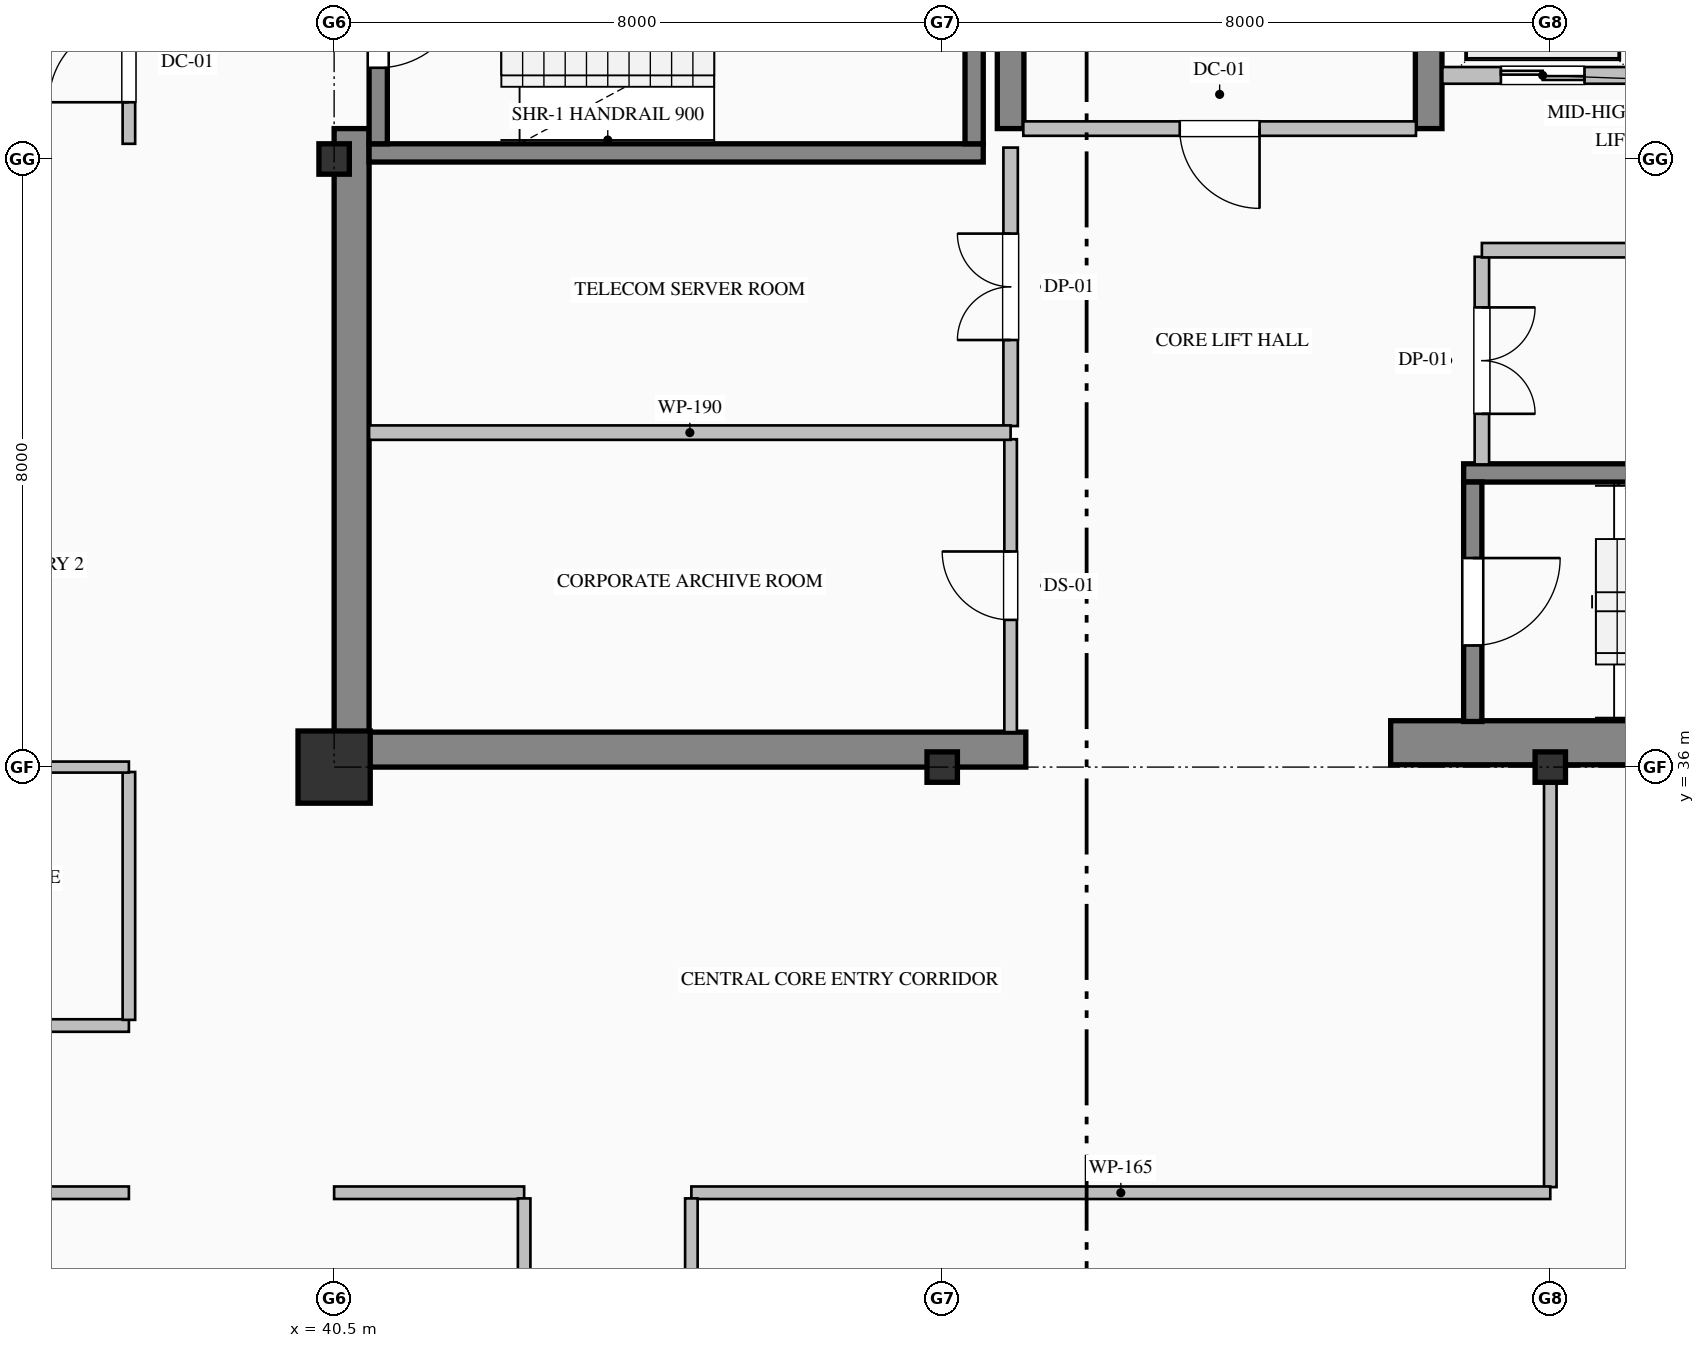
"""IFC4 building model, lengths in metres.
Left out: names, types, materials, properties, quantities, classifications, styles, units other than length and angle.
Written with IfcOpenShell. Run it as: python <this file> out.ifc"""

import sys

from ifc_helpers import new_model, si_unit, direction, frame, frame_2d, origin, origin_2d, place, context, subcontext, project, spatial, rectangle, hollow_rectangle, i_section, extrude, element, fill, save


model = new_model("IFC4")
c1 = context("Model", 3, precision=1e-05, world=origin(), true_north=direction((0.0, 1.0)))
c2 = subcontext(c1, "Body", "Model", "MODEL_VIEW")
j1 = project(units=[si_unit("LENGTHUNIT", "METRE"), si_unit("PLANEANGLEUNIT", "RADIAN")], contexts=[c1])
p1 = place(None, origin())
s1 = spatial("IfcSite", under=j1, at=p1, CompositionType="ELEMENT")
p2 = place(p1, origin())
s2 = spatial("IfcBuilding", under=s1, at=p2, CompositionType="ELEMENT")
p3 = place(p2, frame((0.0, 0.0, 225.8)))
s3 = spatial("IfcBuildingStorey", under=s2, at=p3, CompositionType="ELEMENT", Elevation=225.8)
p4 = place(p3, frame((40.73, 36.46, 0.0), z_axis=(0.0, 0.0, 1.0), x_axis=(0.0, 1.0, 0.0)))
e1 = element("IfcWall", 1, at=p4, inside=s3, PredefinedType="SHEAR", context=c2, shape_type="SweptSolid", body=[
    extrude(rectangle(XDim=7.94, YDim=0.46, at=frame_2d((3.97, 0.0))), origin(), (0.0, 0.0, 1.0), 3.775),
])
p5 = place(p3, frame((40.5, 36.23, 0.0), z_axis=(0.0, 0.0, 1.0), x_axis=(1.0, 0.0, 0.0)))
e2 = element("IfcWall", 2, at=p5, inside=s3, PredefinedType="SHEAR", context=c2, shape_type="SweptSolid", body=[
    extrude(rectangle(XDim=9.1, YDim=0.46, at=frame_2d((4.55, 0.0))), origin(), (0.0, 0.0, 1.0), 3.775),
])
p6 = place(p3, frame((54.4, 36.32, 0.0), z_axis=(0.0, 0.0, 1.0), x_axis=(1.0, 0.0, 0.0)))
e3 = element("IfcWall", 3, at=p6, inside=s3, PredefinedType="SHEAR", context=c2, shape_type="SweptSolid", body=[
    extrude(rectangle(XDim=9.6, YDim=0.58, at=frame_2d((4.8, 0.0))), origin(), (0.0, 0.0, 1.0), 4.0),
])
p7 = place(p3, frame((49.4, 44.4, 0.0), z_axis=(0.0, 0.0, 1.0), x_axis=(0.0, 1.0, 0.0)))
e4 = element("IfcWall", 4, at=p7, inside=s3, PredefinedType="SHEAR", context=c2, shape_type="SweptSolid", body=[
    extrude(rectangle(XDim=3.0, YDim=0.35, at=frame_2d((1.5, 0.0))), origin(), (0.0, 0.0, 1.0), 3.775),
])
p8 = place(p3, frame((54.9, 44.4, 0.0), z_axis=(0.0, 0.0, 1.0), x_axis=(0.0, 1.0, 0.0)))
e5 = element("IfcWall", 5, at=p8, inside=s3, PredefinedType="SHEAR", context=c2, shape_type="SweptSolid", body=[
    extrude(rectangle(XDim=7.14, YDim=0.35, at=frame_2d((3.57, 0.0))), origin(), (0.0, 0.0, 1.0), 3.775),
])
p9 = place(p3, frame((40.5, 36.0, 0.0), z_axis=(0.0, 0.0, 1.0), x_axis=(1.0, 0.0, 0.0)))
e6 = element("IfcColumn", 6, at=p9, inside=s3, PredefinedType="COLUMN", context=c2, shape_type="SweptSolid", body=[
    extrude(hollow_rectangle(XDim=0.95, YDim=0.95, WallThickness=0.036, at=origin_2d()), origin(), (0.0, 0.0, 1.0), 4.0),
])
for number, where, z_axis, x_axis in (
    (7, (40.5, 44.0, 0.0), (0.0, 0.0, 1.0), (1.0, 0.0, 0.0)),
    (8, (48.5, 36.0, 0.0), (0.0, 0.0, 1.0), (1.0, 0.0, 0.0)),
    (9, (56.5, 36.0, 0.0), (0.0, 0.0, 1.0), (1.0, 0.0, 0.0)),
):
    element("IfcColumn", number, at=place(p3, frame(where, z_axis=z_axis, x_axis=x_axis)), inside=s3, PredefinedType="COLUMN", context=c2, shape_type="SweptSolid", body=[
        extrude(i_section(OverallWidth=0.4, OverallDepth=0.4, WebThickness=0.013, FlangeThickness=0.021, FilletRadius=0.022, at=origin_2d()), origin(), (0.0, 0.0, 1.0), 4.0),
    ])
p10 = place(p3, frame((49.04, 44.08, 0.0), z_axis=(0.0, 0.0, 1.0), x_axis=(-1.0, 0.0, 0.0)))
e10 = element("IfcWall", 10, at=p10, inside=s3, PredefinedType="SOLIDWALL", context=c2, shape_type="SweptSolid", body=[
    extrude(rectangle(XDim=8.08, YDim=0.24, at=frame_2d((4.04, 0.0))), origin(), (0.0, 0.0, 1.0), 4.0),
])
p11 = place(p3, frame((41.08, 47.35, 0.0), z_axis=(0.0, 0.0, 1.0), x_axis=(0.0, -1.0, 0.0)))
e11 = element("IfcWall", 11, at=p11, inside=s3, PredefinedType="SOLIDWALL", context=c2, shape_type="SweptSolid", body=[
    extrude(rectangle(XDim=3.15, YDim=0.24, at=frame_2d((1.575, 0.0))), origin(), (0.0, 0.0, 1.0), 4.0),
])
p12 = place(p11, frame((1.0, 0.0, 0.0)))
e12 = element("IfcOpeningElement", 12, at=p12, cuts=e11, PredefinedType="OPENING", context=c2, shape_type="SweptSolid", body=[
    extrude(rectangle(XDim=1.15, YDim=2.2, at=frame_2d((0.575, 1.1))), frame((0.0, 0.13, 0.0), z_axis=(0.0, -1.0, 0.0), x_axis=(1.0, 0.0, 0.0)), (0.0, 0.0, 1.0), 0.26),
])
p13 = place(p3, frame((48.92, 44.2, 0.0), z_axis=(0.0, 0.0, 1.0), x_axis=(0.0, 1.0, 0.0)))
e13 = element("IfcWall", 13, at=p13, inside=s3, PredefinedType="SOLIDWALL", context=c2, shape_type="SweptSolid", body=[
    extrude(rectangle(XDim=3.15, YDim=0.24, at=frame_2d((1.575, 0.0))), origin(), (0.0, 0.0, 1.0), 4.0),
])
p14 = place(p3, frame((55.36, 39.87, 0.0), z_axis=(0.0, 0.0, 1.0), x_axis=(1.0, 0.0, 0.0)))
e14 = element("IfcWall", 14, at=p14, inside=s3, PredefinedType="SOLIDWALL", context=c2, shape_type="SweptSolid", body=[
    extrude(rectangle(XDim=8.08, YDim=0.24, at=frame_2d((4.04, 0.0))), origin(), (0.0, 0.0, 1.0), 4.0),
])
p15 = place(p3, frame((55.48, 39.75, 0.0), z_axis=(0.0, 0.0, 1.0), x_axis=(0.0, -1.0, 0.0)))
e15 = element("IfcWall", 15, at=p15, inside=s3, PredefinedType="SOLIDWALL", context=c2, shape_type="SweptSolid", body=[
    extrude(rectangle(XDim=3.15, YDim=0.24, at=frame_2d((1.575, 0.0))), origin(), (0.0, 0.0, 1.0), 4.0),
])
p16 = place(p15, frame((1.0, 0.0, 0.0)))
e16 = element("IfcOpeningElement", 16, at=p16, cuts=e15, PredefinedType="OPENING", context=c2, shape_type="SweptSolid", body=[
    extrude(rectangle(XDim=1.15, YDim=2.2, at=frame_2d((0.575, 1.1))), frame((0.0, 0.13, 0.0), z_axis=(0.0, -1.0, 0.0), x_axis=(1.0, 0.0, 0.0)), (0.0, 0.0, 1.0), 0.26),
])
p17 = place(p3, frame((63.32, 45.1, 0.0), z_axis=(0.0, 0.0, 1.0), x_axis=(-1.0, 0.0, 0.0)))
e17 = element("IfcWall", 17, at=p17, inside=s3, PredefinedType="PARTITIONING", context=c2, shape_type="SweptSolid", body=[
    extrude(rectangle(XDim=8.24, YDim=0.22, at=frame_2d((4.12, 0.0))), origin(), (0.0, 0.0, 1.0), 3.775),
])
p18 = place(p17, frame((6.37, 0.0, 0.0)))
e18 = element("IfcOpeningElement", 18, at=p18, cuts=e17, PredefinedType="OPENING", context=c2, shape_type="SweptSolid", body=[
    extrude(rectangle(XDim=1.1, YDim=2.2, at=frame_2d((0.55, 1.1))), frame((0.0, 0.12, 0.0), z_axis=(0.0, -1.0, 0.0), x_axis=(1.0, 0.0, 0.0)), (0.0, 0.0, 1.0), 0.24),
])
p19 = place(p17, frame((3.57, 0.0, 0.0)))
e19 = element("IfcOpeningElement", 19, at=p19, cuts=e17, PredefinedType="OPENING", context=c2, shape_type="SweptSolid", body=[
    extrude(rectangle(XDim=1.1, YDim=2.2, at=frame_2d((0.55, 1.1))), frame((0.0, 0.12, 0.0), z_axis=(0.0, -1.0, 0.0), x_axis=(1.0, 0.0, 0.0)), (0.0, 0.0, 1.0), 0.24),
])
p20 = place(p17, frame((0.77, 0.0, 0.0)))
e20 = element("IfcOpeningElement", 20, at=p20, cuts=e17, PredefinedType="OPENING", context=c2, shape_type="SweptSolid", body=[
    extrude(rectangle(XDim=1.1, YDim=2.2, at=frame_2d((0.55, 1.1))), frame((0.0, 0.12, 0.0), z_axis=(0.0, -1.0, 0.0), x_axis=(1.0, 0.0, 0.0)), (0.0, 0.0, 1.0), 0.24),
])
p21 = place(p3, frame((37.8, 44.2, 0.0), z_axis=(0.0, 0.0, 1.0), x_axis=(0.0, 1.0, 0.0)))
e21 = element("IfcWall", 21, at=p21, inside=s3, PredefinedType="PARTITIONING", context=c2, shape_type="SweptSolid", body=[
    extrude(rectangle(XDim=2.143, YDim=0.165, at=frame_2d((1.072, 0.0))), origin(), (0.0, 0.0, 1.0), 3.775),
])
p22 = place(p21, frame((0.546, 0.0, 0.0)))
e22 = element("IfcOpeningElement", 22, at=p22, cuts=e21, PredefinedType="OPENING", context=c2, shape_type="SweptSolid", body=[
    extrude(rectangle(XDim=1.05, YDim=2.15, at=frame_2d((0.525, 1.075))), frame((0.0, 0.093, 0.0), z_axis=(0.0, -1.0, 0.0), x_axis=(1.0, 0.0, 0.0)), (0.0, 0.0, 1.0), 0.185),
])
p23 = place(p3, frame((54.733, 44.4, 0.0), z_axis=(0.0, 0.0, 1.0), x_axis=(-1.0, 0.0, 0.0)))
e23 = element("IfcWall", 23, at=p23, inside=s3, PredefinedType="PARTITIONING", context=c2, shape_type="SweptSolid", body=[
    extrude(rectangle(XDim=5.166, YDim=0.19, at=frame_2d((2.583, 0.0))), origin(), (0.0, 0.0, 1.0), 3.775),
])
p24 = place(p23, frame((2.058, 0.0, 0.0)))
e24 = element("IfcOpeningElement", 24, at=p24, cuts=e23, PredefinedType="OPENING", context=c2, shape_type="SweptSolid", body=[
    extrude(rectangle(XDim=1.05, YDim=2.15, at=frame_2d((0.525, 1.075))), frame((0.0, 0.105, 0.0), z_axis=(0.0, -1.0, 0.0), x_axis=(1.0, 0.0, 0.0)), (0.0, 0.0, 1.0), 0.21),
])
p25 = place(p3, frame((49.4, 36.46, 0.0), z_axis=(0.0, 0.0, 1.0), x_axis=(0.0, 1.0, 0.0)))
e25 = element("IfcWall", 25, at=p25, inside=s3, PredefinedType="PARTITIONING", context=c2, shape_type="SweptSolid", body=[
    extrude(rectangle(XDim=3.853, YDim=0.165, at=frame_2d((1.927, 0.0))), origin(), (0.0, 0.0, 1.0), 3.017),
])
p26 = place(p25, frame((1.477, 0.0, 0.0)))
e26 = element("IfcOpeningElement", 26, at=p26, cuts=e25, PredefinedType="OPENING", context=c2, shape_type="SweptSolid", body=[
    extrude(rectangle(XDim=0.9, YDim=2.15, at=frame_2d((0.45, 1.075))), frame((0.0, 0.093, 0.0), z_axis=(0.0, -1.0, 0.0), x_axis=(1.0, 0.0, 0.0)), (0.0, 0.0, 1.0), 0.185),
])
p27 = place(p3, frame((49.4, 40.487, 0.0), z_axis=(0.0, 0.0, 1.0), x_axis=(0.0, 1.0, 0.0)))
e27 = element("IfcWall", 27, at=p27, inside=s3, PredefinedType="PARTITIONING", context=c2, shape_type="SweptSolid", body=[
    extrude(rectangle(XDim=3.663, YDim=0.19, at=frame_2d((1.832, 0.0))), origin(), (0.0, 0.0, 1.0), 3.017),
])
p28 = place(p27, frame((1.132, 0.0, 0.0)))
e28 = element("IfcOpeningElement", 28, at=p28, cuts=e27, PredefinedType="OPENING", context=c2, shape_type="SweptSolid", body=[
    extrude(rectangle(XDim=1.4, YDim=2.25, at=frame_2d((0.7, 1.125))), frame((0.0, 0.105, 0.0), z_axis=(0.0, -1.0, 0.0), x_axis=(1.0, 0.0, 0.0)), (0.0, 0.0, 1.0), 0.21),
])
p29 = place(p3, frame((55.6, 42.713, 0.0), z_axis=(0.0, 0.0, 1.0), x_axis=(0.0, -1.0, 0.0)))
e29 = element("IfcWall", 29, at=p29, inside=s3, PredefinedType="PARTITIONING", context=c2, shape_type="SweptSolid", body=[
    extrude(rectangle(XDim=2.731, YDim=0.19, at=frame_2d((1.365, 0.0))), origin(), (0.0, 0.0, 1.0), 3.775),
])
p30 = place(p29, frame((0.666, 0.0, 0.0)))
e30 = element("IfcOpeningElement", 30, at=p30, cuts=e29, PredefinedType="OPENING", context=c2, shape_type="SweptSolid", body=[
    extrude(rectangle(XDim=1.4, YDim=2.25, at=frame_2d((0.7, 1.125))), frame((0.0, 0.105, 0.0), z_axis=(0.0, -1.0, 0.0), x_axis=(1.0, 0.0, 0.0)), (0.0, 0.0, 1.0), 0.21),
])
p31 = place(p3, frame((40.96, 40.4, 0.0), z_axis=(0.0, 0.0, 1.0), x_axis=(1.0, 0.0, 0.0)))
e31 = element("IfcWall", 31, at=p31, inside=s3, PredefinedType="PARTITIONING", context=c2, shape_type="SweptSolid", body=[
    extrude(rectangle(XDim=8.44, YDim=0.19, at=frame_2d((4.22, 0.0))), origin(), (0.0, 0.0, 1.0), 3.775),
])
p32 = place(p3, frame((58.2, 42.8, 0.0), z_axis=(0.0, 0.0, 1.0), x_axis=(-1.0, 0.0, 0.0)))
e32 = element("IfcWall", 32, at=p32, inside=s3, PredefinedType="PARTITIONING", context=c2, shape_type="SweptSolid", body=[
    extrude(rectangle(XDim=2.6, YDim=0.19, at=frame_2d((1.3, 0.0))), origin(), (0.0, 0.0, 1.0), 3.775),
])
p33 = place(p3, frame((37.8, 30.4, 0.0), z_axis=(0.0, 0.0, 1.0), x_axis=(-1.0, 0.0, 0.0)))
e33 = element("IfcWall", 33, at=p33, inside=s3, PredefinedType="PARTITIONING", context=c2, shape_type="SweptSolid", body=[
    extrude(rectangle(XDim=21.3, YDim=0.165, at=frame_2d((10.65, 0.0))), origin(), (0.0, 0.0, 1.0), 3.775),
])
p34 = place(p33, frame((10.15, 0.0, 0.0)))
e34 = element("IfcOpeningElement", 34, at=p34, cuts=e33, PredefinedType="OPENING", context=c2, shape_type="SweptSolid", body=[
    extrude(rectangle(XDim=1.0, YDim=2.15, at=frame_2d((0.5, 1.075))), frame((0.0, 0.093, 0.0), z_axis=(0.0, -1.0, 0.0), x_axis=(1.0, 0.0, 0.0)), (0.0, 0.0, 1.0), 0.185),
])
p35 = place(p3, frame((29.6, 32.6, 0.0), z_axis=(0.0, 0.0, 1.0), x_axis=(1.0, 0.0, 0.0)))
e35 = element("IfcWall", 35, at=p35, inside=s3, PredefinedType="PARTITIONING", context=c2, shape_type="SweptSolid", body=[
    extrude(rectangle(XDim=8.2, YDim=0.165, at=frame_2d((4.1, 0.0))), origin(), (0.0, 0.0, 1.0), 3.775),
])
p36 = place(p35, frame((3.6, 0.0, 0.0)))
e36 = element("IfcOpeningElement", 36, at=p36, cuts=e35, PredefinedType="OPENING", context=c2, shape_type="SweptSolid", body=[
    extrude(rectangle(XDim=1.0, YDim=2.15, at=frame_2d((0.5, 1.075))), frame((0.0, 0.093, 0.0), z_axis=(0.0, -1.0, 0.0), x_axis=(1.0, 0.0, 0.0)), (0.0, 0.0, 1.0), 0.185),
])
p37 = place(p3, frame((56.5, 36.0, 0.0), z_axis=(0.0, 0.0, 1.0), x_axis=(0.0, -1.0, 0.0)))
e37 = element("IfcWall", 37, at=p37, inside=s3, PredefinedType="PARTITIONING", context=c2, shape_type="SweptSolid", body=[
    extrude(rectangle(XDim=5.525, YDim=0.165, at=frame_2d((2.763, 0.0))), origin(), (0.0, 0.0, 1.0), 3.179),
])
p38 = place(p3, frame((56.5, 30.4, 0.0), z_axis=(0.0, 0.0, 1.0), x_axis=(-1.0, 0.0, 0.0)))
e38 = element("IfcWall", 38, at=p38, inside=s3, PredefinedType="PARTITIONING", context=c2, shape_type="SweptSolid", body=[
    extrude(rectangle(XDim=11.3, YDim=0.165, at=frame_2d((5.65, 0.0))), origin(), (0.0, 0.0, 1.0), 3.775),
])
p39 = place(p3, frame((37.8, 32.675, 0.0), z_axis=(0.0, 0.0, 1.0), x_axis=(0.0, 1.0, 0.0)))
e39 = element("IfcWall", 39, at=p39, inside=s3, PredefinedType="PARTITIONING", context=c2, shape_type="SweptSolid", body=[
    extrude(rectangle(XDim=3.261, YDim=0.165, at=frame_2d((1.63, 0.0))), origin(), (0.0, 0.0, 1.0), 3.775),
])
p40 = place(p3, frame((43.0, 30.4, 0.0), z_axis=(0.0, 0.0, 1.0), x_axis=(-1.0, 0.0, 0.0)))
e40 = element("IfcWall", 40, at=p40, inside=s3, PredefinedType="PARTITIONING", context=c2, shape_type="SweptSolid", body=[
    extrude(rectangle(XDim=2.5, YDim=0.165, at=frame_2d((1.25, 0.0))), origin(), (0.0, 0.0, 1.0), 3.775),
])
p41 = place(p3, frame((45.2, 30.325, 0.0), z_axis=(0.0, 0.0, 1.0), x_axis=(0.0, -1.0, 0.0)))
e41 = element("IfcWall", 41, at=p41, inside=s3, PredefinedType="PARTITIONING", context=c2, shape_type="SweptSolid", body=[
    extrude(rectangle(XDim=6.851, YDim=0.165, at=frame_2d((3.425, 0.0))), origin(), (0.0, 0.0, 1.0), 3.775),
])
p42 = place(p3, frame((43.0, 21.274, 0.0), z_axis=(0.0, 0.0, 1.0), x_axis=(0.0, 1.0, 0.0)))
e42 = element("IfcWall", 42, at=p42, inside=s3, PredefinedType="PARTITIONING", context=c2, shape_type="SweptSolid", body=[
    extrude(rectangle(XDim=9.051, YDim=0.165, at=frame_2d((4.525, 0.0))), origin(), (0.0, 0.0, 1.0), 3.775),
])
p43 = place(p42, frame((3.976, 0.0, 0.0)))
e43 = element("IfcOpeningElement", 43, at=p43, cuts=e42, PredefinedType="OPENING", context=c2, shape_type="SweptSolid", body=[
    extrude(rectangle(XDim=1.1, YDim=2.2, at=frame_2d((0.55, 1.1))), frame((0.0, 0.093, 0.0), z_axis=(0.0, -1.0, 0.0), x_axis=(1.0, 0.0, 0.0)), (0.0, 0.0, 1.0), 0.185),
])
p44 = place(p3, frame((29.6, 36.0, 0.0), z_axis=(0.0, 0.0, 1.0), x_axis=(1.0, 0.0, 0.0)))
e44 = element("IfcWall", 44, at=p44, inside=s3, PredefinedType="PARTITIONING", context=c2, shape_type="SweptSolid", body=[
    extrude(rectangle(XDim=8.2, YDim=0.145, at=frame_2d((4.1, 0.0))), origin(), (0.0, 0.0, 1.0), 3.179),
])
p45 = place(p12, origin())
e45 = element("IfcDoor", 45, at=p45, inside=s3, OperationType="SINGLE_SWING_LEFT", PredefinedType="DOOR", context=c2, shape_type="SweptSolid", body=[
    extrude(rectangle(XDim=1.15, YDim=2.2, at=frame_2d((0.575, 1.1))), frame((0.0, 0.025, 0.0), z_axis=(0.0, -1.0, 0.0), x_axis=(1.0, 0.0, 0.0)), (0.0, 0.0, 1.0), 0.05),
])
fill(e12, e45)
p46 = place(p16, origin())
e46 = element("IfcDoor", 46, at=p46, inside=s3, OperationType="SINGLE_SWING_LEFT", PredefinedType="DOOR", context=c2, shape_type="SweptSolid", body=[
    extrude(rectangle(XDim=1.15, YDim=2.2, at=frame_2d((0.575, 1.1))), frame((0.0, 0.025, 0.0), z_axis=(0.0, -1.0, 0.0), x_axis=(1.0, 0.0, 0.0)), (0.0, 0.0, 1.0), 0.05),
])
fill(e16, e46)
p47 = place(p18, origin())
e47 = element("IfcDoor", 47, at=p47, inside=s3, OperationType="DOUBLE_DOOR_SLIDING", PredefinedType="DOOR", context=c2, shape_type="SweptSolid", body=[
    extrude(rectangle(XDim=1.1, YDim=2.2, at=frame_2d((0.55, 1.1))), frame((0.0, 0.025, 0.0), z_axis=(0.0, -1.0, 0.0), x_axis=(1.0, 0.0, 0.0)), (0.0, 0.0, 1.0), 0.05),
])
fill(e18, e47)
p48 = place(p24, origin())
e48 = element("IfcDoor", 48, at=p48, inside=s3, OperationType="SINGLE_SWING_LEFT", PredefinedType="DOOR", context=c2, shape_type="SweptSolid", body=[
    extrude(rectangle(XDim=1.05, YDim=2.15, at=frame_2d((0.525, 1.075))), frame((0.0, 0.025, 0.0), z_axis=(0.0, -1.0, 0.0), x_axis=(1.0, 0.0, 0.0)), (0.0, 0.0, 1.0), 0.05),
])
fill(e24, e48)
p49 = place(p22, origin())
e49 = element("IfcDoor", 49, at=p49, inside=s3, OperationType="SINGLE_SWING_LEFT", PredefinedType="DOOR", context=c2, shape_type="SweptSolid", body=[
    extrude(rectangle(XDim=1.05, YDim=2.15, at=frame_2d((0.525, 1.075))), frame((0.0, 0.025, 0.0), z_axis=(0.0, -1.0, 0.0), x_axis=(1.0, 0.0, 0.0)), (0.0, 0.0, 1.0), 0.05),
])
fill(e22, e49)
p50 = place(p26, origin())
e50 = element("IfcDoor", 50, at=p50, inside=s3, OperationType="SINGLE_SWING_RIGHT", PredefinedType="DOOR", context=c2, shape_type="SweptSolid", body=[
    extrude(rectangle(XDim=0.9, YDim=2.15, at=frame_2d((0.45, 1.075))), frame((0.0, 0.025, 0.0), z_axis=(0.0, -1.0, 0.0), x_axis=(1.0, 0.0, 0.0)), (0.0, 0.0, 1.0), 0.05),
])
fill(e26, e50)
p51 = place(p28, origin())
e51 = element("IfcDoor", 51, at=p51, inside=s3, OperationType="DOUBLE_DOOR_SINGLE_SWING", PredefinedType="DOOR", context=c2, shape_type="SweptSolid", body=[
    extrude(rectangle(XDim=1.4, YDim=2.25, at=frame_2d((0.7, 1.125))), frame((0.0, 0.025, 0.0), z_axis=(0.0, -1.0, 0.0), x_axis=(1.0, 0.0, 0.0)), (0.0, 0.0, 1.0), 0.05),
])
fill(e28, e51)
p52 = place(p30, origin())
e52 = element("IfcDoor", 52, at=p52, inside=s3, OperationType="DOUBLE_DOOR_SINGLE_SWING", PredefinedType="DOOR", context=c2, shape_type="SweptSolid", body=[
    extrude(rectangle(XDim=1.4, YDim=2.25, at=frame_2d((0.7, 1.125))), frame((0.0, 0.025, 0.0), z_axis=(0.0, -1.0, 0.0), x_axis=(1.0, 0.0, 0.0)), (0.0, 0.0, 1.0), 0.05),
])
fill(e30, e52)
save(model, sys.argv[1])
